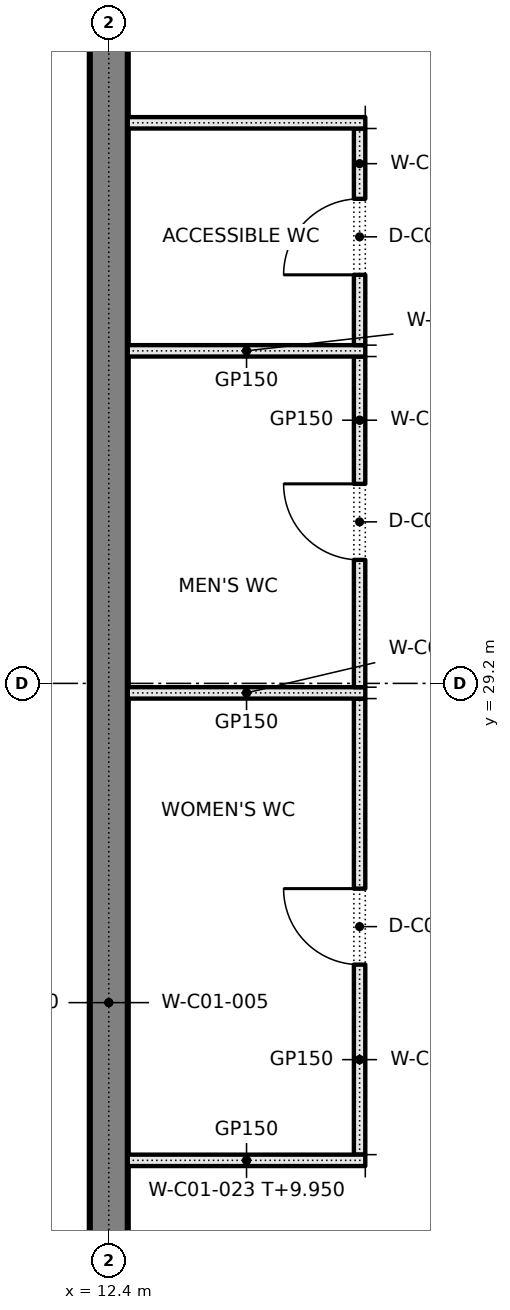
"""IFC4 building model, lengths in metres.
Left out: names, types, materials, properties, quantities, classifications, styles, units other than length and angle.
Written with IfcOpenShell. Run it as: python <this file> out.ifc"""

import sys

from ifc_helpers import new_model, si_unit, direction, frame, frame_2d, origin, place, context, subcontext, project, spatial, rectangle, extrude, element, fill, save


model = new_model("IFC4")
c1 = context("Model", 3, precision=1e-05, world=origin(), true_north=direction((0.0, 1.0)))
c2 = subcontext(c1, "Body", "Model", "MODEL_VIEW")
j1 = project(units=[si_unit("LENGTHUNIT", "METRE"), si_unit("PLANEANGLEUNIT", "RADIAN")], contexts=[c1])
p1 = place(None, origin())
s1 = spatial("IfcSite", under=j1, at=p1, CompositionType="ELEMENT")
p2 = place(p1, origin())
s2 = spatial("IfcBuilding", under=s1, at=p2, CompositionType="ELEMENT")
p3 = place(p2, frame((0.0, 0.0, 5.4)))
s3 = spatial("IfcBuildingStorey", under=s2, at=p3, CompositionType="ELEMENT", Elevation=5.4)
p4 = place(p3, frame((12.4, 3.75, 0.0), z_axis=(0.0, 0.0, 1.0), x_axis=(0.0, 1.0, 0.0)))
e1 = element("IfcWall", 1, at=p4, inside=s3, PredefinedType="SOLIDWALL", context=c2, shape_type="SweptSolid", body=[
    extrude(rectangle(XDim=42.5, YDim=0.5, at=frame_2d((21.25, 0.0))), origin(), (0.0, 0.0, 1.0), 4.8),
])
p5 = place(p3, frame((15.7, 23.0, 0.0), z_axis=(0.0, 0.0, 1.0), x_axis=(0.0, 1.0, 0.0)))
e2 = element("IfcWall", 2, at=p5, inside=s3, PredefinedType="PARTITIONING", context=c2, shape_type="SweptSolid", body=[
    extrude(rectangle(XDim=6.0, YDim=0.15, at=frame_2d((3.0, 0.0))), origin(), (0.0, 0.0, 1.0), 4.55),
])
p6 = place(p5, frame((2.5, 0.0, 0.0)))
e3 = element("IfcOpeningElement", 3, at=p6, cuts=e2, PredefinedType="OPENING", context=c2, shape_type="SweptSolid", body=[
    extrude(rectangle(XDim=1.0, YDim=2.1, at=frame_2d((0.5, 1.05))), frame((0.0, 0.085, 0.0), z_axis=(0.0, -1.0, 0.0), x_axis=(1.0, 0.0, 0.0)), (0.0, 0.0, 1.0), 0.17),
])
for number, where, z_axis, x_axis in (
    (4, (12.65, 22.925, 0.0), (0.0, 0.0, 1.0), (1.0, 0.0, 0.0)),
    (5, (12.65, 29.075, 0.0), (0.0, 0.0, 1.0), (1.0, 0.0, 0.0)),
):
    element("IfcWall", number, at=place(p3, frame(where, z_axis=z_axis, x_axis=x_axis)), inside=s3, PredefinedType="PARTITIONING", context=c2, shape_type="SweptSolid", body=[
        extrude(rectangle(XDim=3.125, YDim=0.15, at=frame_2d((1.562, 0.0))), origin(), (0.0, 0.0, 1.0), 4.55),
    ])
p7 = place(p3, frame((15.7, 29.15, 0.0), z_axis=(0.0, 0.0, 1.0), x_axis=(0.0, 1.0, 0.0)))
e6 = element("IfcWall", 6, at=p7, inside=s3, PredefinedType="PARTITIONING", context=c2, shape_type="SweptSolid", body=[
    extrude(rectangle(XDim=4.35, YDim=0.15, at=frame_2d((2.175, 0.0))), origin(), (0.0, 0.0, 1.0), 4.55),
])
p8 = place(p7, frame((1.675, 0.0, 0.0)))
e7 = element("IfcOpeningElement", 7, at=p8, cuts=e6, PredefinedType="OPENING", context=c2, shape_type="SweptSolid", body=[
    extrude(rectangle(XDim=1.0, YDim=2.1, at=frame_2d((0.5, 1.05))), frame((0.0, 0.085, 0.0), z_axis=(0.0, -1.0, 0.0), x_axis=(1.0, 0.0, 0.0)), (0.0, 0.0, 1.0), 0.17),
])
p9 = place(p3, frame((12.65, 33.575, 0.0), z_axis=(0.0, 0.0, 1.0), x_axis=(1.0, 0.0, 0.0)))
e8 = element("IfcWall", 8, at=p9, inside=s3, PredefinedType="PARTITIONING", context=c2, shape_type="SweptSolid", body=[
    extrude(rectangle(XDim=3.125, YDim=0.15, at=frame_2d((1.562, 0.0))), origin(), (0.0, 0.0, 1.0), 4.55),
])
p10 = place(p3, frame((15.7, 33.65, 0.0), z_axis=(0.0, 0.0, 1.0), x_axis=(0.0, 1.0, 0.0)))
e9 = element("IfcWall", 9, at=p10, inside=s3, PredefinedType="PARTITIONING", context=c2, shape_type="SweptSolid", body=[
    extrude(rectangle(XDim=2.85, YDim=0.15, at=frame_2d((1.425, 0.0))), origin(), (0.0, 0.0, 1.0), 4.55),
])
p11 = place(p10, frame((0.925, 0.0, 0.0)))
e10 = element("IfcOpeningElement", 10, at=p11, cuts=e9, PredefinedType="OPENING", context=c2, shape_type="SweptSolid", body=[
    extrude(rectangle(XDim=1.0, YDim=2.1, at=frame_2d((0.5, 1.05))), frame((0.0, 0.085, 0.0), z_axis=(0.0, -1.0, 0.0), x_axis=(1.0, 0.0, 0.0)), (0.0, 0.0, 1.0), 0.17),
])
p12 = place(p3, frame((12.65, 36.575, 0.0), z_axis=(0.0, 0.0, 1.0), x_axis=(1.0, 0.0, 0.0)))
e11 = element("IfcWall", 11, at=p12, inside=s3, PredefinedType="PARTITIONING", context=c2, shape_type="SweptSolid", body=[
    extrude(rectangle(XDim=3.125, YDim=0.15, at=frame_2d((1.562, 0.0))), origin(), (0.0, 0.0, 1.0), 4.55),
])
p13 = place(p6, origin())
e12 = element("IfcDoor", 12, at=p13, inside=s3, OperationType="SINGLE_SWING_RIGHT", PredefinedType="DOOR", context=c2, shape_type="SweptSolid", body=[
    extrude(rectangle(XDim=1.0, YDim=2.1, at=frame_2d((0.5, 1.05))), frame((0.0, 0.025, 0.0), z_axis=(0.0, -1.0, 0.0), x_axis=(1.0, 0.0, 0.0)), (0.0, 0.0, 1.0), 0.05),
])
fill(e3, e12)
p14 = place(p8, origin())
e13 = element("IfcDoor", 13, at=p14, inside=s3, OperationType="SINGLE_SWING_RIGHT", PredefinedType="DOOR", context=c2, shape_type="SweptSolid", body=[
    extrude(rectangle(XDim=1.0, YDim=2.1, at=frame_2d((0.5, 1.05))), frame((0.0, 0.025, 0.0), z_axis=(0.0, -1.0, 0.0), x_axis=(1.0, 0.0, 0.0)), (0.0, 0.0, 1.0), 0.05),
])
fill(e7, e13)
p15 = place(p11, origin())
e14 = element("IfcDoor", 14, at=p15, inside=s3, OperationType="SINGLE_SWING_LEFT", PredefinedType="DOOR", context=c2, shape_type="SweptSolid", body=[
    extrude(rectangle(XDim=1.0, YDim=2.1, at=frame_2d((0.5, 1.05))), frame((0.0, 0.025, 0.0), z_axis=(0.0, -1.0, 0.0), x_axis=(1.0, 0.0, 0.0)), (0.0, 0.0, 1.0), 0.05),
])
fill(e10, e14)
save(model, sys.argv[1])
